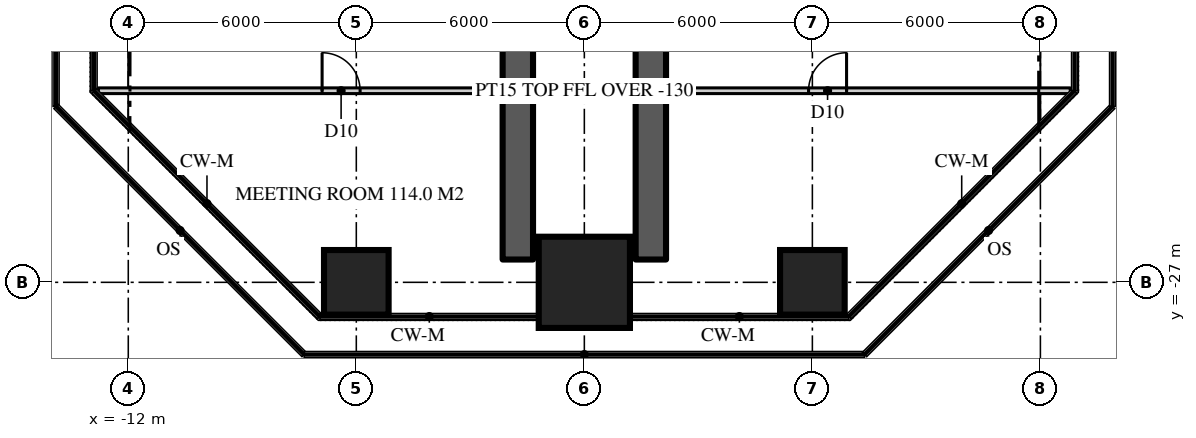
"""IFC4 building model, lengths in metres.
Left out: names, types, materials, properties, quantities, classifications, styles, units other than length and angle.
Written with IfcOpenShell. Run it as: python <this file> out.ifc"""

import sys

from ifc_helpers import new_model, si_unit, direction, frame, frame_2d, origin, origin_2d, place, context, subcontext, project, spatial, rectangle, extrude, element, fill, save


model = new_model("IFC4")
c1 = context("Model", 3, precision=1e-05, world=origin(), true_north=direction((0.0, 1.0)))
c2 = subcontext(c1, "Body", "Model", "MODEL_VIEW")
j1 = project(units=[si_unit("LENGTHUNIT", "METRE"), si_unit("PLANEANGLEUNIT", "RADIAN")], contexts=[c1])
p1 = place(None, origin())
s1 = spatial("IfcSite", under=j1, at=p1, CompositionType="ELEMENT")
p2 = place(p1, origin())
s2 = spatial("IfcBuilding", under=s1, at=p2, CompositionType="ELEMENT")
p3 = place(p2, frame((0.0, 0.0, 182.7)))
s3 = spatial("IfcBuildingStorey", under=s2, at=p3, CompositionType="ELEMENT", Elevation=182.7)
for number, where, z_axis, x_axis in (
    (1, (-1.75, -11.15, 0.0), (0.0, 0.0, 1.0), (0.0, -1.0, 0.0)),
    (2, (1.75, -11.15, 0.0), (0.0, 0.0, 1.0), (0.0, -1.0, 0.0)),
):
    element("IfcWall", number, at=place(p3, frame(where, z_axis=z_axis, x_axis=x_axis)), inside=s3, PredefinedType="SHEAR", context=c2, shape_type="SweptSolid", body=[
        extrude(rectangle(XDim=15.25, YDim=0.8, at=frame_2d((7.625, 0.0))), origin(), (0.0, 0.0, 1.0), 3.9),
    ])
p4 = place(p3, frame((-6.0, -27.0, 0.0), z_axis=(0.0, 0.0, 1.0), x_axis=(1.0, 0.0, 0.0)))
e3 = element("IfcColumn", 3, at=p4, inside=s3, PredefinedType="COLUMN", context=c2, shape_type="SweptSolid", body=[
    extrude(rectangle(XDim=1.7, YDim=1.7, at=origin_2d()), origin(), (0.0, 0.0, 1.0), 3.9),
])
p5 = place(p3, frame((0.0, -27.0, 0.0), z_axis=(0.0, 0.0, 1.0), x_axis=(1.0, 0.0, 0.0)))
e4 = element("IfcColumn", 4, at=p5, inside=s3, PredefinedType="COLUMN", context=c2, shape_type="SweptSolid", body=[
    extrude(rectangle(XDim=2.4, YDim=2.4, at=origin_2d()), origin(), (0.0, 0.0, 1.0), 3.9),
])
p6 = place(p3, frame((6.0, -27.0, 0.0), z_axis=(0.0, 0.0, 1.0), x_axis=(1.0, 0.0, 0.0)))
e5 = element("IfcColumn", 5, at=p6, inside=s3, PredefinedType="COLUMN", context=c2, shape_type="SweptSolid", body=[
    extrude(rectangle(XDim=1.7, YDim=1.7, at=origin_2d()), origin(), (0.0, 0.0, 1.0), 3.9),
])
p7 = place(p3, frame((-12.786, -21.959, 0.0), z_axis=(0.0, 0.0, 1.0), x_axis=(1.0, 0.0, 0.0)))
e6 = element("IfcWall", 6, at=p7, inside=s3, PredefinedType="PARTITIONING", context=c2, shape_type="SweptSolid", body=[
    extrude(rectangle(XDim=25.573, YDim=0.15, at=frame_2d((12.786, 0.0))), origin(), (0.0, 0.0, 1.0), 3.77),
])
p8 = place(p7, frame((18.687, 0.0, 0.0)))
e7 = element("IfcOpeningElement", 7, at=p8, cuts=e6, PredefinedType="OPENING", context=c2, shape_type="SweptSolid", body=[
    extrude(rectangle(XDim=1.0, YDim=2.2, at=frame_2d((0.5, 1.1))), frame((0.0, 0.085, 0.0), z_axis=(0.0, -1.0, 0.0), x_axis=(1.0, 0.0, 0.0)), (0.0, 0.0, 1.0), 0.17),
])
p9 = place(p7, frame((5.886, 0.0, 0.0)))
e8 = element("IfcOpeningElement", 8, at=p9, cuts=e6, PredefinedType="OPENING", context=c2, shape_type="SweptSolid", body=[
    extrude(rectangle(XDim=1.0, YDim=2.2, at=frame_2d((0.5, 1.1))), frame((0.0, 0.085, 0.0), z_axis=(0.0, -1.0, 0.0), x_axis=(1.0, 0.0, 0.0)), (0.0, 0.0, 1.0), 0.17),
])
p10 = place(p8, origin())
e9 = element("IfcDoor", 9, at=p10, inside=s3, OperationType="SINGLE_SWING_RIGHT", PredefinedType="DOOR", context=c2, shape_type="SweptSolid", body=[
    extrude(rectangle(XDim=1.0, YDim=2.2, at=frame_2d((0.5, 1.1))), frame((0.0, 0.025, 0.0), z_axis=(0.0, -1.0, 0.0), x_axis=(1.0, 0.0, 0.0)), (0.0, 0.0, 1.0), 0.05),
])
fill(e7, e9)
p11 = place(p9, origin())
e10 = element("IfcDoor", 10, at=p11, inside=s3, OperationType="SINGLE_SWING_LEFT", PredefinedType="DOOR", context=c2, shape_type="SweptSolid", body=[
    extrude(rectangle(XDim=1.0, YDim=2.2, at=frame_2d((0.5, 1.1))), frame((0.0, 0.025, 0.0), z_axis=(0.0, -1.0, 0.0), x_axis=(1.0, 0.0, 0.0)), (0.0, 0.0, 1.0), 0.05),
])
fill(e8, e10)
save(model, sys.argv[1])
